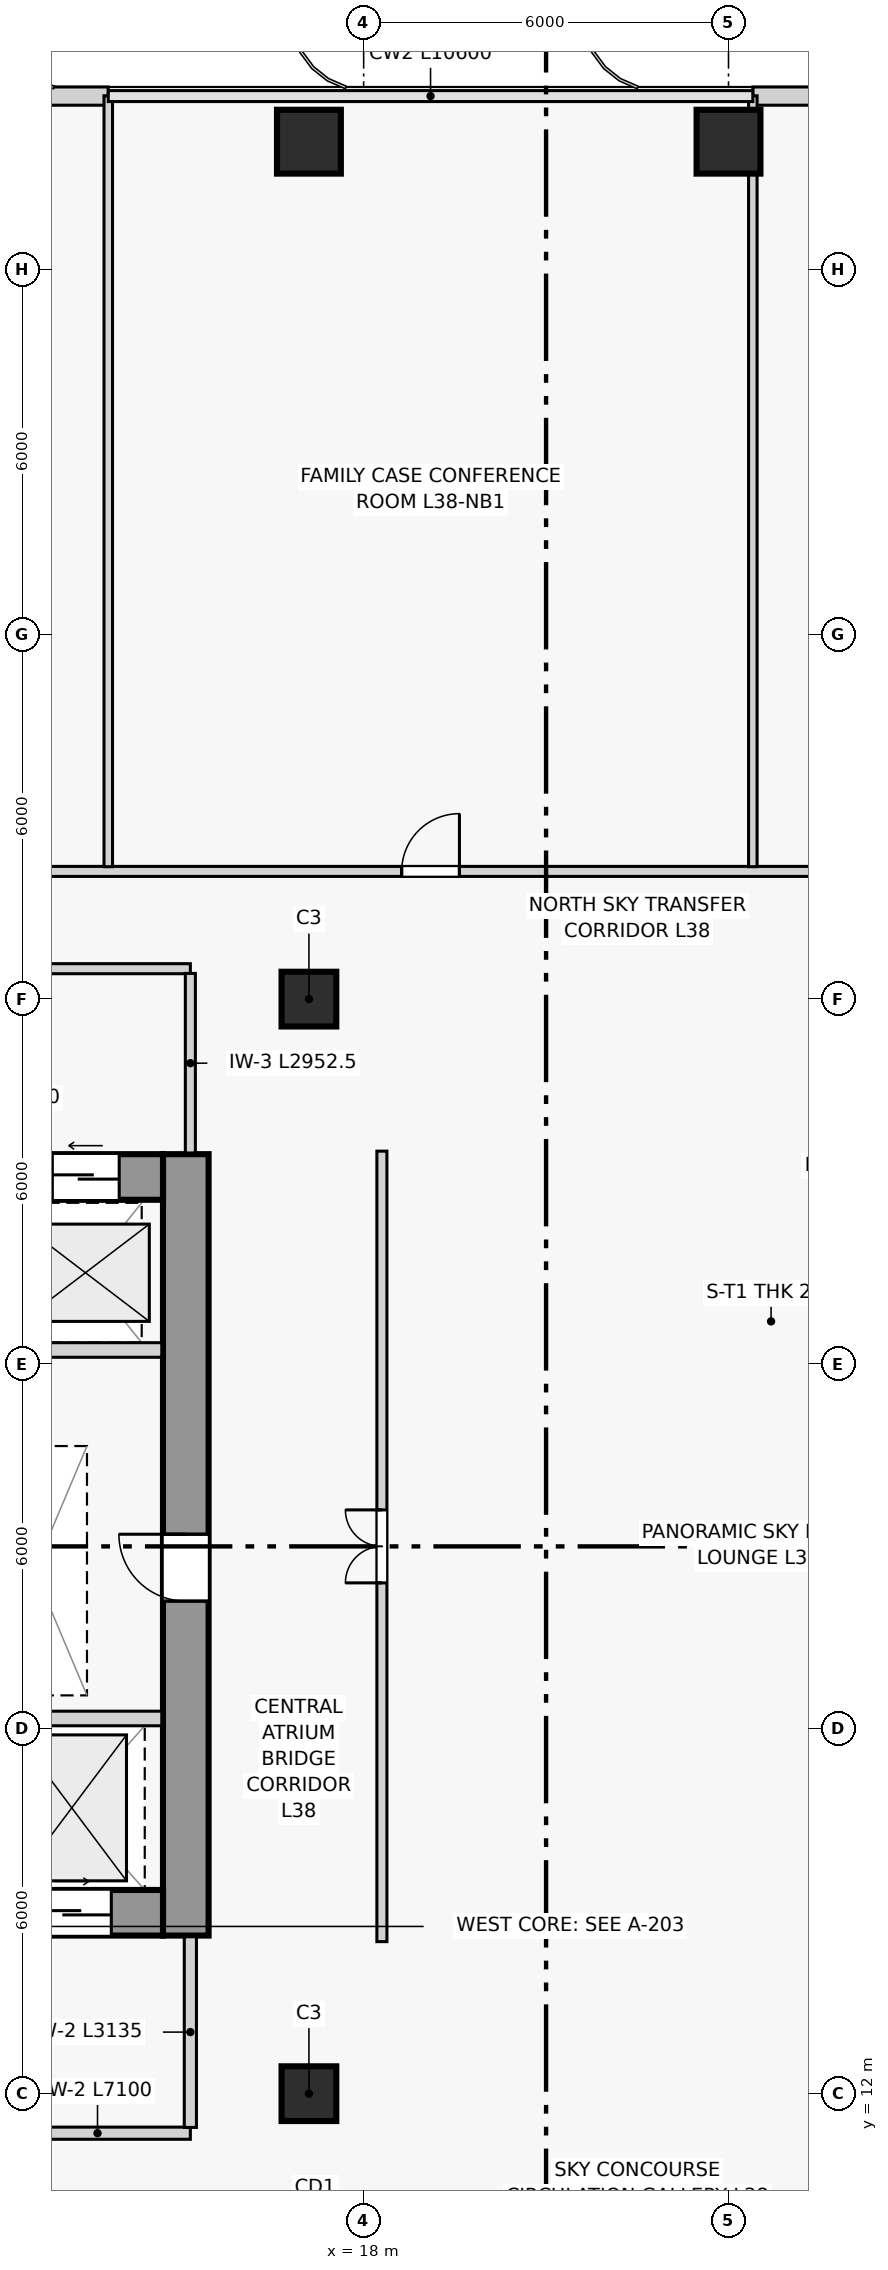
"""IFC4 building model, lengths in metres.
Left out: names, types, materials, properties, quantities, classifications, styles, units other than length and angle.
Written with IfcOpenShell. Run it as: python <this file> out.ifc"""

import sys

from ifc_helpers import new_model, si_unit, direction, frame, frame_2d, origin, origin_2d, place, context, subcontext, project, spatial, rectangle, extrude, source, transform, mapped, element, fill, save


model = new_model("IFC4")
c1 = context("Model", 3, precision=1e-05, world=origin(), true_north=direction((0.0, 1.0)))
c2 = subcontext(c1, "Body", "Model", "MODEL_VIEW")
j1 = project(units=[si_unit("LENGTHUNIT", "METRE"), si_unit("PLANEANGLEUNIT", "RADIAN")], contexts=[c1])
p1 = place(None, origin())
s1 = spatial("IfcSite", under=j1, at=p1, CompositionType="ELEMENT")
p2 = place(p1, origin())
s2 = spatial("IfcBuilding", under=s1, at=p2, CompositionType="ELEMENT")
p3 = place(p2, frame((0.0, 0.0, 144.9)))
s3 = spatial("IfcBuildingStorey", under=s2, at=p3, CompositionType="ELEMENT", Elevation=144.9)
p4 = place(p3, frame((15.075, 14.6, 0.0), z_axis=(0.0, 0.0, 1.0), x_axis=(0.0, 1.0, 0.0)))
e1 = element("IfcWall", 1, at=p4, inside=s3, PredefinedType="SHEAR", context=c2, shape_type="SweptSolid", body=[
    extrude(rectangle(XDim=12.85, YDim=0.75, at=frame_2d((6.425, 0.0))), origin(), (0.0, 0.0, 1.0), 3.6),
])
p5 = place(p4, frame((5.5, 0.0, 0.0)))
e2 = element("IfcOpeningElement", 2, at=p5, cuts=e1, PredefinedType="OPENING", context=c2, shape_type="SweptSolid", body=[
    extrude(rectangle(XDim=1.1, YDim=2.2, at=frame_2d((0.55, 1.1))), frame((0.0, 0.385, 0.0), z_axis=(0.0, -1.0, 0.0), x_axis=(1.0, 0.0, 0.0)), (0.0, 0.0, 1.0), 0.77),
])
p6 = place(p3, frame((8.15, 14.975, 0.0), z_axis=(0.0, 0.0, 1.0), x_axis=(1.0, 0.0, 0.0)))
e3 = element("IfcWall", 3, at=p6, inside=s3, PredefinedType="SHEAR", context=c2, shape_type="SweptSolid", body=[
    extrude(rectangle(XDim=6.55, YDim=0.75, at=frame_2d((3.275, 0.0))), origin(), (0.0, 0.0, 1.0), 3.6),
])
p7 = place(p6, frame((0.9, 0.0, 0.0)))
e4 = element("IfcOpeningElement", 4, at=p7, cuts=e3, PredefinedType="OPENING", context=c2, shape_type="SweptSolid", body=[
    extrude(rectangle(XDim=1.1, YDim=2.2, at=frame_2d((0.55, 1.1))), frame((0.0, 0.385, 0.0), z_axis=(0.0, -1.0, 0.0), x_axis=(1.0, 0.0, 0.0)), (0.0, 0.0, 1.0), 0.77),
])
p8 = place(p6, frame((4.4, 0.0, 0.0)))
e5 = element("IfcOpeningElement", 5, at=p8, cuts=e3, PredefinedType="OPENING", context=c2, shape_type="SweptSolid", body=[
    extrude(rectangle(XDim=1.3, YDim=2.2, at=frame_2d((0.65, 1.1))), frame((0.0, 0.385, 0.0), z_axis=(0.0, -1.0, 0.0), x_axis=(1.0, 0.0, 0.0)), (0.0, 0.0, 1.0), 0.77),
])
p9 = place(p3, frame((8.15, 27.075, 0.0), z_axis=(0.0, 0.0, 1.0), x_axis=(1.0, 0.0, 0.0)))
e6 = element("IfcWall", 6, at=p9, inside=s3, PredefinedType="SHEAR", context=c2, shape_type="SweptSolid", body=[
    extrude(rectangle(XDim=6.55, YDim=0.75, at=frame_2d((3.275, 0.0))), origin(), (0.0, 0.0, 1.0), 3.6),
])
p10 = place(p9, frame((0.43, 0.0, 0.0)))
e7 = element("IfcOpeningElement", 7, at=p10, cuts=e6, PredefinedType="OPENING", context=c2, shape_type="SweptSolid", body=[
    extrude(rectangle(XDim=1.1, YDim=2.2, at=frame_2d((0.55, 1.1))), frame((0.0, 0.385, 0.0), z_axis=(0.0, -1.0, 0.0), x_axis=(1.0, 0.0, 0.0)), (0.0, 0.0, 1.0), 0.77),
])
p11 = place(p9, frame((2.57, 0.0, 0.0)))
e8 = element("IfcOpeningElement", 8, at=p11, cuts=e6, PredefinedType="OPENING", context=c2, shape_type="SweptSolid", body=[
    extrude(rectangle(XDim=1.1, YDim=2.2, at=frame_2d((0.55, 1.1))), frame((0.0, 0.385, 0.0), z_axis=(0.0, -1.0, 0.0), x_axis=(1.0, 0.0, 0.0)), (0.0, 0.0, 1.0), 0.77),
])
p12 = place(p9, frame((4.73, 0.0, 0.0)))
e9 = element("IfcOpeningElement", 9, at=p12, cuts=e6, PredefinedType="OPENING", context=c2, shape_type="SweptSolid", body=[
    extrude(rectangle(XDim=1.1, YDim=2.2, at=frame_2d((0.55, 1.1))), frame((0.0, 0.385, 0.0), z_axis=(0.0, -1.0, 0.0), x_axis=(1.0, 0.0, 0.0)), (0.0, 0.0, 1.0), 0.77),
])
m1 = source(origin(), c2, "Body", "SweptSolid", [
    extrude(rectangle(XDim=1.05, YDim=1.05, at=origin_2d()), origin(), (0.0, 0.0, 1.0), 3.6),
])
for number, where, z_axis, x_axis in (
    (10, (17.1, 44.1, 0.0), (0.0, 0.0, 1.0), (1.0, 0.0, 0.0)),
    (11, (24.0, 44.1, 0.0), (0.0, 0.0, 1.0), (1.0, 0.0, 0.0)),
):
    element("IfcColumn", number, at=place(p3, frame(where, z_axis=z_axis, x_axis=x_axis)), inside=s3, PredefinedType="COLUMN", context=c2, shape_type="MappedRepresentation", body=[
        mapped(m1, transform((0.0, 0.0, 0.0), scale=1.0)),
    ])
m2 = source(origin(), c2, "Body", "SweptSolid", [
    extrude(rectangle(XDim=0.9, YDim=0.9, at=origin_2d()), origin(), (0.0, 0.0, 1.0), 3.6),
])
for number, where, z_axis, x_axis in (
    (12, (17.1, 12.0, 0.0), (0.0, 0.0, 1.0), (1.0, 0.0, 0.0)),
    (13, (17.1, 30.0, 0.0), (0.0, 0.0, 1.0), (1.0, 0.0, 0.0)),
):
    element("IfcColumn", number, at=place(p3, frame(where, z_axis=z_axis, x_axis=x_axis)), inside=s3, PredefinedType="COLUMN", context=c2, shape_type="MappedRepresentation", body=[
        mapped(m2, transform((0.0, 0.0, 0.0), scale=1.0)),
    ])
p13 = place(p3, frame((41.25, 44.85, 0.0), z_axis=(0.0, 0.0, 1.0), x_axis=(-1.0, 0.0, 0.0)))
e14 = element("IfcWall", 14, at=p13, inside=s3, PredefinedType="SOLIDWALL", context=c2, shape_type="SweptSolid", body=[
    extrude(rectangle(XDim=16.85, YDim=0.3, at=frame_2d((8.425, 0.0))), origin(), (0.0, 0.0, 1.0), 3.28),
])
p14 = place(p13, frame((3.075, 0.0, 0.8)))
e15 = element("IfcOpeningElement", 15, at=p14, cuts=e14, PredefinedType="OPENING", context=c2, shape_type="SweptSolid", body=[
    extrude(rectangle(XDim=1.8, YDim=2.1, at=frame_2d((0.9, 1.05))), frame((0.0, 0.16, 0.0), z_axis=(0.0, -1.0, 0.0), x_axis=(1.0, 0.0, 0.0)), (0.0, 0.0, 1.0), 0.32),
])
p15 = place(p13, frame((9.305, 0.0, 0.8)))
e16 = element("IfcOpeningElement", 16, at=p15, cuts=e14, PredefinedType="OPENING", context=c2, shape_type="SweptSolid", body=[
    extrude(rectangle(XDim=1.8, YDim=2.1, at=frame_2d((0.9, 1.05))), frame((0.0, 0.16, 0.0), z_axis=(0.0, -1.0, 0.0), x_axis=(1.0, 0.0, 0.0)), (0.0, 0.0, 1.0), 0.32),
])
p16 = place(p13, frame((13.495, 0.0, 0.8)))
e17 = element("IfcOpeningElement", 17, at=p16, cuts=e14, PredefinedType="OPENING", context=c2, shape_type="SweptSolid", body=[
    extrude(rectangle(XDim=1.8, YDim=2.1, at=frame_2d((0.9, 1.05))), frame((0.0, 0.16, 0.0), z_axis=(0.0, -1.0, 0.0), x_axis=(1.0, 0.0, 0.0)), (0.0, 0.0, 1.0), 0.32),
])
p17 = place(p3, frame((13.8, 44.85, 0.0), z_axis=(0.0, 0.0, 1.0), x_axis=(-1.0, 0.0, 0.0)))
e18 = element("IfcWall", 18, at=p17, inside=s3, PredefinedType="SOLIDWALL", context=c2, shape_type="SweptSolid", body=[
    extrude(rectangle(XDim=10.05, YDim=0.3, at=frame_2d((5.025, 0.0))), origin(), (0.0, 0.0, 1.0), 3.28),
])
p18 = place(p17, frame((1.792, 0.0, 0.8)))
e19 = element("IfcOpeningElement", 19, at=p18, cuts=e18, PredefinedType="OPENING", context=c2, shape_type="SweptSolid", body=[
    extrude(rectangle(XDim=1.8, YDim=2.1, at=frame_2d((0.9, 1.05))), frame((0.0, 0.16, 0.0), z_axis=(0.0, -1.0, 0.0), x_axis=(1.0, 0.0, 0.0)), (0.0, 0.0, 1.0), 0.32),
])
p19 = place(p17, frame((6.458, 0.0, 0.8)))
e20 = element("IfcOpeningElement", 20, at=p19, cuts=e18, PredefinedType="OPENING", context=c2, shape_type="SweptSolid", body=[
    extrude(rectangle(XDim=1.8, YDim=2.1, at=frame_2d((0.9, 1.05))), frame((0.0, 0.16, 0.0), z_axis=(0.0, -1.0, 0.0), x_axis=(1.0, 0.0, 0.0)), (0.0, 0.0, 1.0), 0.32),
])
p20 = place(p3, frame((11.76, 18.17, 0.0), z_axis=(0.0, 0.0, 1.0), x_axis=(1.0, 0.0, 0.0)))
e21 = element("IfcWall", 21, at=p20, inside=s3, PredefinedType="PARTITIONING", context=c2, shape_type="SweptSolid", body=[
    extrude(rectangle(XDim=2.92, YDim=0.24, at=frame_2d((1.46, 0.0))), origin(), (0.0, 0.0, 1.0), 3.28),
])
p21 = place(p3, frame((8.05, 11.35, 0.0), z_axis=(0.0, 0.0, 1.0), x_axis=(1.0, 0.0, 0.0)))
e22 = element("IfcWall", 22, at=p21, inside=s3, PredefinedType="PARTITIONING", context=c2, shape_type="SweptSolid", body=[
    extrude(rectangle(XDim=7.1, YDim=0.2, at=frame_2d((3.55, 0.0))), origin(), (0.0, 0.0, 1.0), 3.28),
])
p22 = place(p21, frame((2.846, 0.0, 0.0)))
e23 = element("IfcOpeningElement", 23, at=p22, cuts=e22, PredefinedType="OPENING", context=c2, shape_type="SweptSolid", body=[
    extrude(rectangle(XDim=1.2, YDim=2.2, at=frame_2d((0.6, 1.1))), frame((0.0, 0.11, 0.0), z_axis=(0.0, -1.0, 0.0), x_axis=(1.0, 0.0, 0.0)), (0.0, 0.0, 1.0), 0.22),
])
p23 = place(p3, frame((15.15, 11.445, 0.0), z_axis=(0.0, 0.0, 1.0), x_axis=(0.0, 1.0, 0.0)))
e24 = element("IfcWall", 24, at=p23, inside=s3, PredefinedType="PARTITIONING", context=c2, shape_type="SweptSolid", body=[
    extrude(rectangle(XDim=3.135, YDim=0.2, at=frame_2d((1.567, 0.0))), origin(), (0.0, 0.0, 1.0), 3.28),
])
p24 = place(p3, frame((8.15, 24.23, 0.0), z_axis=(0.0, 0.0, 1.0), x_axis=(1.0, 0.0, 0.0)))
e25 = element("IfcWall", 25, at=p24, inside=s3, PredefinedType="PARTITIONING", context=c2, shape_type="SweptSolid", body=[
    extrude(rectangle(XDim=6.53, YDim=0.24, at=frame_2d((3.265, 0.0))), origin(), (0.0, 0.0, 1.0), 3.28),
])
p25 = place(p3, frame((8.05, 30.5, 0.0), z_axis=(0.0, 0.0, 1.0), x_axis=(1.0, 0.0, 0.0)))
e26 = element("IfcWall", 26, at=p25, inside=s3, PredefinedType="PARTITIONING", context=c2, shape_type="SweptSolid", body=[
    extrude(rectangle(XDim=7.1, YDim=0.165, at=frame_2d((3.55, 0.0))), origin(), (0.0, 0.0, 1.0), 3.28),
])
p26 = place(p25, frame((2.95, 0.0, 0.0)))
e27 = element("IfcOpeningElement", 27, at=p26, cuts=e26, PredefinedType="OPENING", context=c2, shape_type="SweptSolid", body=[
    extrude(rectangle(XDim=1.2, YDim=2.2, at=frame_2d((0.6, 1.1))), frame((0.0, 0.093, 0.0), z_axis=(0.0, -1.0, 0.0), x_axis=(1.0, 0.0, 0.0)), (0.0, 0.0, 1.0), 0.185),
])
p27 = place(p3, frame((15.15, 27.47, 0.0), z_axis=(0.0, 0.0, 1.0), x_axis=(0.0, 1.0, 0.0)))
e28 = element("IfcWall", 28, at=p27, inside=s3, PredefinedType="PARTITIONING", context=c2, shape_type="SweptSolid", body=[
    extrude(rectangle(XDim=2.953, YDim=0.165, at=frame_2d((1.476, 0.0))), origin(), (0.0, 0.0, 1.0), 3.28),
])
p28 = place(p3, frame((0.145, 32.1, 0.0), z_axis=(0.0, 0.0, 1.0), x_axis=(1.0, 0.0, 0.0)))
e29 = element("IfcWall", 29, at=p28, inside=s3, PredefinedType="PARTITIONING", context=c2, shape_type="SweptSolid", body=[
    extrude(rectangle(XDim=44.71, YDim=0.165, at=frame_2d((22.355, 0.0))), origin(), (0.0, 0.0, 1.0), 3.28),
])
p29 = place(p28, frame((8.12, 0.0, 0.0)))
e30 = element("IfcOpeningElement", 30, at=p29, cuts=e29, PredefinedType="OPENING", context=c2, shape_type="SweptSolid", body=[
    extrude(rectangle(XDim=0.95, YDim=2.1, at=frame_2d((0.475, 1.05))), frame((0.0, 0.093, 0.0), z_axis=(0.0, -1.0, 0.0), x_axis=(1.0, 0.0, 0.0)), (0.0, 0.0, 1.0), 0.185),
])
p30 = place(p28, frame((18.48, 0.0, 0.0)))
e31 = element("IfcOpeningElement", 31, at=p30, cuts=e29, PredefinedType="OPENING", context=c2, shape_type="SweptSolid", body=[
    extrude(rectangle(XDim=0.95, YDim=2.1, at=frame_2d((0.475, 1.05))), frame((0.0, 0.093, 0.0), z_axis=(0.0, -1.0, 0.0), x_axis=(1.0, 0.0, 0.0)), (0.0, 0.0, 1.0), 0.185),
])
p31 = place(p28, frame((28.13, 0.0, 0.0)))
e32 = element("IfcOpeningElement", 32, at=p31, cuts=e29, PredefinedType="OPENING", context=c2, shape_type="SweptSolid", body=[
    extrude(rectangle(XDim=1.25, YDim=2.2, at=frame_2d((0.625, 1.1))), frame((0.0, 0.093, 0.0), z_axis=(0.0, -1.0, 0.0), x_axis=(1.0, 0.0, 0.0)), (0.0, 0.0, 1.0), 0.185),
])
p32 = place(p28, frame((36.59, 0.0, 0.0)))
e33 = element("IfcOpeningElement", 33, at=p32, cuts=e29, PredefinedType="OPENING", context=c2, shape_type="SweptSolid", body=[
    extrude(rectangle(XDim=1.25, YDim=2.2, at=frame_2d((0.625, 1.1))), frame((0.0, 0.093, 0.0), z_axis=(0.0, -1.0, 0.0), x_axis=(1.0, 0.0, 0.0)), (0.0, 0.0, 1.0), 0.185),
])
p33 = place(p3, frame((18.3, 14.5, 0.0), z_axis=(0.0, 0.0, 1.0), x_axis=(0.0, 1.0, 0.0)))
e34 = element("IfcWall", 34, at=p33, inside=s3, PredefinedType="PARTITIONING", context=c2, shape_type="SweptSolid", body=[
    extrude(rectangle(XDim=13.0, YDim=0.165, at=frame_2d((6.5, 0.0))), origin(), (0.0, 0.0, 1.0), 3.28),
])
p34 = place(p33, frame((5.9, 0.0, 0.0)))
e35 = element("IfcOpeningElement", 35, at=p34, cuts=e34, PredefinedType="OPENING", context=c2, shape_type="SweptSolid", body=[
    extrude(rectangle(XDim=1.2, YDim=2.2, at=frame_2d((0.6, 1.1))), frame((0.0, 0.093, 0.0), z_axis=(0.0, -1.0, 0.0), x_axis=(1.0, 0.0, 0.0)), (0.0, 0.0, 1.0), 0.185),
])
for number, where, z_axis, x_axis in (
    (36, (13.8, 32.177, 0.0), (0.0, 0.0, 1.0), (0.0, 1.0, 0.0)),
    (37, (24.4, 32.177, 0.0), (0.0, 0.0, 1.0), (0.0, 1.0, 0.0)),
):
    element("IfcWall", number, at=place(p3, frame(where, z_axis=z_axis, x_axis=x_axis)), inside=s3, PredefinedType="PARTITIONING", context=c2, shape_type="SweptSolid", body=[
        extrude(rectangle(XDim=12.677, YDim=0.14, at=frame_2d((6.339, 0.0))), origin(), (0.0, 0.0, 1.0), 3.28),
    ])
m3 = source(origin(), c2, "Body", "SweptSolid", [
    extrude(rectangle(XDim=1.3, YDim=2.2, at=frame_2d((0.65, 1.1))), frame((0.0, 0.025, 0.0), z_axis=(0.0, -1.0, 0.0), x_axis=(1.0, 0.0, 0.0)), (0.0, 0.0, 1.0), 0.05),
])
p35 = place(p8, origin())
e38 = element("IfcDoor", 38, at=p35, inside=s3, OperationType="SLIDING_TO_RIGHT", PredefinedType="DOOR", context=c2, shape_type="MappedRepresentation", body=[
    mapped(m3, transform((0.0, 0.0, 0.0), scale=1.0)),
])
fill(e5, e38)
m4 = source(origin(), c2, "Body", "SweptSolid", [
    extrude(rectangle(XDim=1.1, YDim=2.2, at=frame_2d((0.55, 1.1))), frame((0.0, 0.025, 0.0), z_axis=(0.0, -1.0, 0.0), x_axis=(1.0, 0.0, 0.0)), (0.0, 0.0, 1.0), 0.05),
])
p36 = place(p12, origin())
e39 = element("IfcDoor", 39, at=p36, inside=s3, OperationType="SLIDING_TO_LEFT", PredefinedType="DOOR", context=c2, shape_type="MappedRepresentation", body=[
    mapped(m4, transform((0.0, 0.0, 0.0), scale=1.0)),
])
fill(e9, e39)
m5 = source(origin(), c2, "Body", "SweptSolid", [
    extrude(rectangle(XDim=1.1, YDim=2.2, at=frame_2d((0.55, 1.1))), frame((0.0, 0.025, 0.0), z_axis=(0.0, -1.0, 0.0), x_axis=(1.0, 0.0, 0.0)), (0.0, 0.0, 1.0), 0.05),
])
p37 = place(p5, origin())
e40 = element("IfcDoor", 40, at=p37, inside=s3, OperationType="SINGLE_SWING_RIGHT", PredefinedType="DOOR", context=c2, shape_type="MappedRepresentation", body=[
    mapped(m5, transform((0.0, 0.0, 0.0), scale=1.0)),
])
fill(e2, e40)
m6 = source(origin(), c2, "Body", "SweptSolid", [
    extrude(rectangle(XDim=1.2, YDim=2.2, at=frame_2d((0.6, 1.1))), frame((0.0, 0.025, 0.0), z_axis=(0.0, -1.0, 0.0), x_axis=(1.0, 0.0, 0.0)), (0.0, 0.0, 1.0), 0.05),
])
p38 = place(p34, origin())
e41 = element("IfcDoor", 41, at=p38, inside=s3, OperationType="DOUBLE_DOOR_SINGLE_SWING", PredefinedType="DOOR", context=c2, shape_type="MappedRepresentation", body=[
    mapped(m6, transform((0.0, 0.0, 0.0), scale=1.0)),
])
fill(e35, e41)
m7 = source(origin(), c2, "Body", "SweptSolid", [
    extrude(rectangle(XDim=0.95, YDim=2.1, at=frame_2d((0.475, 1.05))), frame((0.0, 0.025, 0.0), z_axis=(0.0, -1.0, 0.0), x_axis=(1.0, 0.0, 0.0)), (0.0, 0.0, 1.0), 0.05),
])
p39 = place(p30, origin())
e42 = element("IfcDoor", 42, at=p39, inside=s3, OperationType="SINGLE_SWING_RIGHT", PredefinedType="DOOR", context=c2, shape_type="MappedRepresentation", body=[
    mapped(m7, transform((0.0, 0.0, 0.0), scale=1.0)),
])
fill(e31, e42)
save(model, sys.argv[1])
